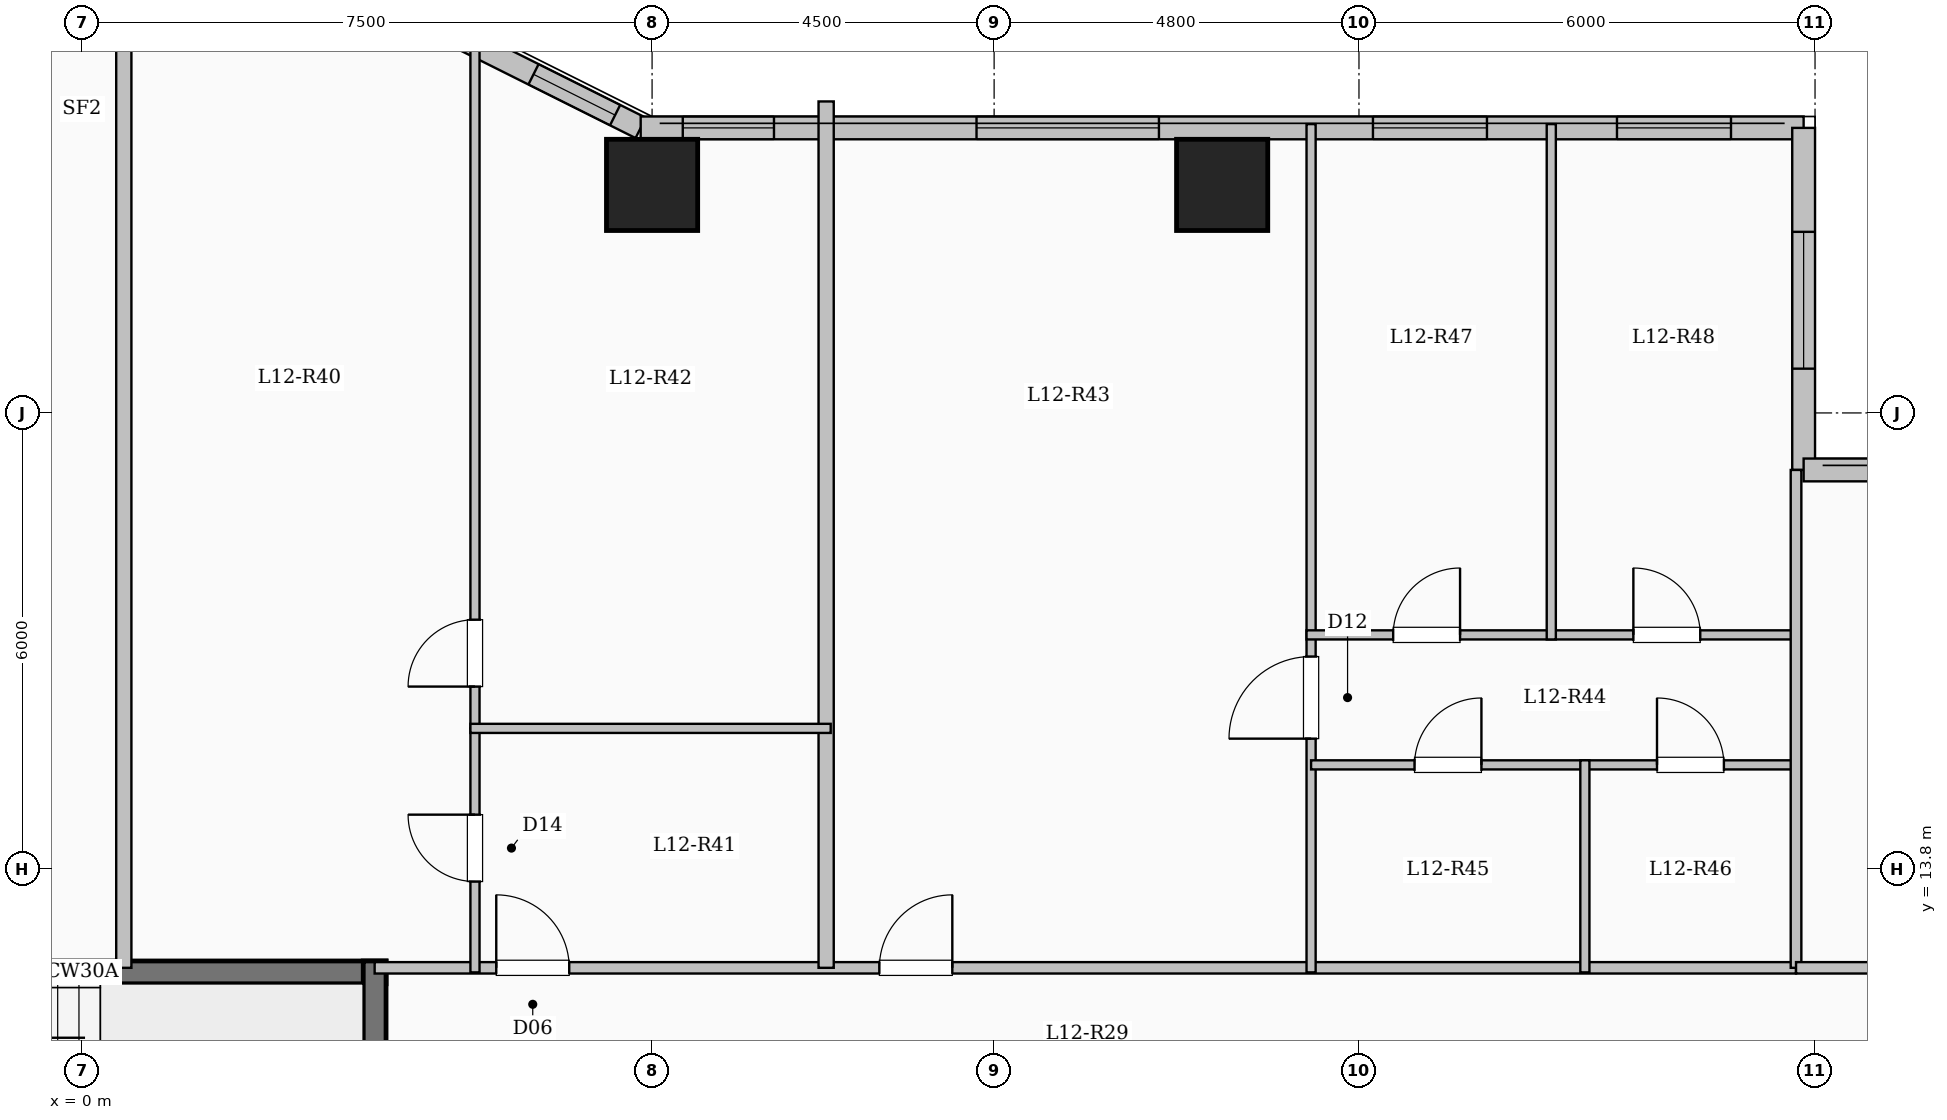
"""IFC4 building model, lengths in metres.
Left out: names, types, materials, properties, quantities, classifications, styles, units other than length and angle.
Written with IfcOpenShell. Run it as: python <this file> out.ifc"""

import sys

from ifc_helpers import new_model, si_unit, direction, frame, frame_2d, origin, origin_2d, place, context, subcontext, project, spatial, rectangle, extrude, element, fill, save


model = new_model("IFC4")
c1 = context("Model", 3, precision=1e-05, world=origin(), true_north=direction((0.0, 1.0)))
c2 = subcontext(c1, "Body", "Model", "MODEL_VIEW")
j1 = project(units=[si_unit("LENGTHUNIT", "METRE"), si_unit("PLANEANGLEUNIT", "RADIAN")], contexts=[c1])
p1 = place(None, origin())
s1 = spatial("IfcSite", under=j1, at=p1, CompositionType="ELEMENT")
p2 = place(p1, origin())
s2 = spatial("IfcBuilding", under=s1, at=p2, CompositionType="ELEMENT")
p3 = place(p2, frame((0.0, 0.0, 47.45)))
s3 = spatial("IfcBuildingStorey", under=s2, at=p3, CompositionType="ELEMENT", Elevation=47.45)
for number, where, z_axis, x_axis in (
    (1, (7.5, 22.8, 0.0), (0.0, 0.0, 1.0), (1.0, 0.0, 0.0)),
    (2, (15.0, 22.8, 0.0), (0.0, 0.0, 1.0), (1.0, 0.0, 0.0)),
):
    element("IfcColumn", number, at=place(p3, frame(where, z_axis=z_axis, x_axis=x_axis)), inside=s3, PredefinedType="COLUMN", context=c2, shape_type="SweptSolid", body=[
        extrude(rectangle(XDim=1.2, YDim=1.2, at=origin_2d()), origin(), (0.0, 0.0, 1.0), 3.35),
    ])
p4 = place(p3, frame((4.35, 25.05, 0.0), z_axis=(0.0, 0.0, 1.0), x_axis=(0.894427191, -0.4472135955, 0.0)))
e3 = element("IfcWall", 3, at=p4, inside=s3, PredefinedType="SOLIDWALL", context=c2, shape_type="SweptSolid", body=[
    extrude(rectangle(XDim=3.354, YDim=0.3, at=frame_2d((1.677, 0.0))), origin(), (0.0, 0.0, 1.0), 3.1),
])
p5 = place(p4, frame((1.778, 0.0, 0.95)))
e4 = element("IfcOpeningElement", 4, at=p5, cuts=e3, PredefinedType="OPENING", context=c2, shape_type="SweptSolid", body=[
    extrude(rectangle(XDim=1.2, YDim=1.5, at=frame_2d((0.6, 0.75))), frame((0.0, 0.16, 0.0), z_axis=(0.0, -1.0, 0.0), x_axis=(1.0, 0.0, 0.0)), (0.0, 0.0, 1.0), 0.32),
])
p6 = place(p3, frame((7.35, 23.55, 0.0), z_axis=(0.0, 0.0, 1.0), x_axis=(1.0, 0.0, 0.0)))
e5 = element("IfcWall", 5, at=p6, inside=s3, PredefinedType="SOLIDWALL", context=c2, shape_type="SweptSolid", body=[
    extrude(rectangle(XDim=15.3, YDim=0.3, at=frame_2d((7.65, 0.0))), origin(), (0.0, 0.0, 1.0), 3.1),
])
p7 = place(p6, frame((0.554, 0.0, 0.95)))
e6 = element("IfcOpeningElement", 6, at=p7, cuts=e5, PredefinedType="OPENING", context=c2, shape_type="SweptSolid", body=[
    extrude(rectangle(XDim=1.2, YDim=1.5, at=frame_2d((0.6, 0.75))), frame((0.0, 0.16, 0.0), z_axis=(0.0, -1.0, 0.0), x_axis=(1.0, 0.0, 0.0)), (0.0, 0.0, 1.0), 0.32),
])
p8 = place(p6, frame((4.418, 0.0, 0.9)))
e7 = element("IfcOpeningElement", 7, at=p8, cuts=e5, PredefinedType="OPENING", context=c2, shape_type="SweptSolid", body=[
    extrude(rectangle(XDim=2.4, YDim=1.8, at=frame_2d((1.2, 0.9))), frame((0.0, 0.16, 0.0), z_axis=(0.0, -1.0, 0.0), x_axis=(1.0, 0.0, 0.0)), (0.0, 0.0, 1.0), 0.32),
])
p9 = place(p6, frame((9.634, 0.0, 0.9)))
e8 = element("IfcOpeningElement", 8, at=p9, cuts=e5, PredefinedType="OPENING", context=c2, shape_type="SweptSolid", body=[
    extrude(rectangle(XDim=1.5, YDim=1.65, at=frame_2d((0.75, 0.825))), frame((0.0, 0.16, 0.0), z_axis=(0.0, -1.0, 0.0), x_axis=(1.0, 0.0, 0.0)), (0.0, 0.0, 1.0), 0.32),
])
p10 = place(p6, frame((12.844, 0.0, 0.9)))
e9 = element("IfcOpeningElement", 9, at=p10, cuts=e5, PredefinedType="OPENING", context=c2, shape_type="SweptSolid", body=[
    extrude(rectangle(XDim=1.5, YDim=1.65, at=frame_2d((0.75, 0.825))), frame((0.0, 0.16, 0.0), z_axis=(0.0, -1.0, 0.0), x_axis=(1.0, 0.0, 0.0)), (0.0, 0.0, 1.0), 0.32),
])
p11 = place(p3, frame((22.65, 23.55, 0.0), z_axis=(0.0, 0.0, 1.0), x_axis=(0.0, -1.0, 0.0)))
e10 = element("IfcWall", 10, at=p11, inside=s3, PredefinedType="SOLIDWALL", context=c2, shape_type="SweptSolid", body=[
    extrude(rectangle(XDim=4.5, YDim=0.3, at=frame_2d((2.25, 0.0))), origin(), (0.0, 0.0, 1.0), 3.1),
])
p12 = place(p11, frame((1.367, 0.0, 0.9)))
e11 = element("IfcOpeningElement", 11, at=p12, cuts=e10, PredefinedType="OPENING", context=c2, shape_type="SweptSolid", body=[
    extrude(rectangle(XDim=1.8, YDim=1.65, at=frame_2d((0.9, 0.825))), frame((0.0, 0.16, 0.0), z_axis=(0.0, -1.0, 0.0), x_axis=(1.0, 0.0, 0.0)), (0.0, 0.0, 1.0), 0.32),
])
p13 = place(p3, frame((22.65, 19.05, 0.0), z_axis=(0.0, 0.0, 1.0), x_axis=(1.0, 0.0, 0.0)))
e12 = element("IfcWall", 12, at=p13, inside=s3, PredefinedType="SOLIDWALL", context=c2, shape_type="SweptSolid", body=[
    extrude(rectangle(XDim=6.0, YDim=0.3, at=frame_2d((3.0, 0.0))), origin(), (0.0, 0.0, 1.0), 3.1),
])
p14 = place(p13, frame((1.975, 0.0, 0.9)))
e13 = element("IfcOpeningElement", 13, at=p14, cuts=e12, PredefinedType="OPENING", context=c2, shape_type="SweptSolid", body=[
    extrude(rectangle(XDim=2.0, YDim=1.7, at=frame_2d((1.0, 0.85))), frame((0.0, 0.16, 0.0), z_axis=(0.0, -1.0, 0.0), x_axis=(1.0, 0.0, 0.0)), (0.0, 0.0, 1.0), 0.32),
])
p15 = place(p3, frame((-4.0, 12.44, 0.0), z_axis=(0.0, 0.0, 1.0), x_axis=(1.0, 0.0, 0.0)))
e14 = element("IfcWall", 14, at=p15, inside=s3, PredefinedType="SHEAR", context=c2, shape_type="SweptSolid", body=[
    extrude(rectangle(XDim=8.0, YDim=0.3, at=frame_2d((4.0, 0.0))), origin(), (0.0, 0.0, 1.0), 3.35),
])
p16 = place(p3, frame((3.85, 9.0, 0.0), z_axis=(0.0, 0.0, 1.0), x_axis=(0.0, 1.0, 0.0)))
e15 = element("IfcWall", 15, at=p16, inside=s3, PredefinedType="SHEAR", context=c2, shape_type="SweptSolid", body=[
    extrude(rectangle(XDim=3.59, YDim=0.3, at=frame_2d((1.795, 0.0))), origin(), (0.0, 0.0, 1.0), 3.35),
])
p17 = place(p3, frame((3.85, 12.5, 0.0), z_axis=(0.0, 0.0, 1.0), x_axis=(1.0, 0.0, 0.0)))
e16 = element("IfcWall", 16, at=p17, inside=s3, PredefinedType="PARTITIONING", context=c2, shape_type="SweptSolid", body=[
    extrude(rectangle(XDim=18.7, YDim=0.15, at=frame_2d((9.35, 0.0))), origin(), (0.0, 0.0, 1.0), 3.1),
])
p18 = place(p17, frame((1.6, 0.0, 0.0)))
e17 = element("IfcOpeningElement", 17, at=p18, cuts=e16, PredefinedType="OPENING", context=c2, shape_type="SweptSolid", body=[
    extrude(rectangle(XDim=0.96, YDim=2.15, at=frame_2d((0.48, 1.075))), frame((0.0, 0.085, 0.0), z_axis=(0.0, -1.0, 0.0), x_axis=(1.0, 0.0, 0.0)), (0.0, 0.0, 1.0), 0.17),
])
p19 = place(p17, frame((6.64, 0.0, 0.0)))
e18 = element("IfcOpeningElement", 18, at=p19, cuts=e16, PredefinedType="OPENING", context=c2, shape_type="SweptSolid", body=[
    extrude(rectangle(XDim=0.96, YDim=2.15, at=frame_2d((0.48, 1.075))), frame((0.0, 0.085, 0.0), z_axis=(0.0, -1.0, 0.0), x_axis=(1.0, 0.0, 0.0)), (0.0, 0.0, 1.0), 0.17),
])
p20 = place(p3, frame((0.55, 12.5, 0.0), z_axis=(0.0, 0.0, 1.0), x_axis=(0.0, 1.0, 0.0)))
e19 = element("IfcWall", 19, at=p20, inside=s3, PredefinedType="SOLIDWALL", context=c2, shape_type="SweptSolid", body=[
    extrude(rectangle(XDim=12.58, YDim=0.2, at=frame_2d((6.29, 0.0))), origin(), (0.0, 0.0, 1.0), 3.1),
])
p21 = place(p3, frame((9.79, 12.5, 0.0), z_axis=(0.0, 0.0, 1.0), x_axis=(0.0, 1.0, 0.0)))
e20 = element("IfcWall", 20, at=p21, inside=s3, PredefinedType="SOLIDWALL", context=c2, shape_type="SweptSolid", body=[
    extrude(rectangle(XDim=11.398, YDim=0.2, at=frame_2d((5.699, 0.0))), origin(), (0.0, 0.0, 1.0), 3.1),
])
p22 = place(p3, frame((5.17, 12.44, 0.0), z_axis=(0.0, 0.0, 1.0), x_axis=(0.0, 1.0, 0.0)))
e21 = element("IfcWall", 21, at=p22, inside=s3, PredefinedType="PARTITIONING", context=c2, shape_type="SweptSolid", body=[
    extrude(rectangle(XDim=3.21, YDim=0.12, at=frame_2d((1.605, 0.0))), origin(), (0.0, 0.0, 1.0), 3.1),
])
p23 = place(p22, frame((1.195, 0.0, 0.0)))
e22 = element("IfcOpeningElement", 22, at=p23, cuts=e21, PredefinedType="OPENING", context=c2, shape_type="SweptSolid", body=[
    extrude(rectangle(XDim=0.88, YDim=2.1, at=frame_2d((0.44, 1.05))), frame((0.0, 0.07, 0.0), z_axis=(0.0, -1.0, 0.0), x_axis=(1.0, 0.0, 0.0)), (0.0, 0.0, 1.0), 0.14),
])
p24 = place(p3, frame((5.17, 15.65, 0.0), z_axis=(0.0, 0.0, 1.0), x_axis=(0.0, 1.0, 0.0)))
e23 = element("IfcWall", 23, at=p24, inside=s3, PredefinedType="PARTITIONING", context=c2, shape_type="SweptSolid", body=[
    extrude(rectangle(XDim=9.388, YDim=0.12, at=frame_2d((4.694, 0.0))), origin(), (0.0, 0.0, 1.0), 3.1),
])
p25 = place(p24, frame((0.55, 0.0, 0.0)))
e24 = element("IfcOpeningElement", 24, at=p25, cuts=e23, PredefinedType="OPENING", context=c2, shape_type="SweptSolid", body=[
    extrude(rectangle(XDim=0.88, YDim=2.1, at=frame_2d((0.44, 1.05))), frame((0.0, 0.07, 0.0), z_axis=(0.0, -1.0, 0.0), x_axis=(1.0, 0.0, 0.0)), (0.0, 0.0, 1.0), 0.14),
])
p26 = place(p3, frame((5.11, 15.65, 0.0), z_axis=(0.0, 0.0, 1.0), x_axis=(1.0, 0.0, 0.0)))
e25 = element("IfcWall", 25, at=p26, inside=s3, PredefinedType="PARTITIONING", context=c2, shape_type="SweptSolid", body=[
    extrude(rectangle(XDim=4.74, YDim=0.12, at=frame_2d((2.37, 0.0))), origin(), (0.0, 0.0, 1.0), 3.1),
])
p27 = place(p3, frame((16.17, 12.44, 0.0), z_axis=(0.0, 0.0, 1.0), x_axis=(0.0, 1.0, 0.0)))
e26 = element("IfcWall", 26, at=p27, inside=s3, PredefinedType="PARTITIONING", context=c2, shape_type="SweptSolid", body=[
    extrude(rectangle(XDim=11.16, YDim=0.12, at=frame_2d((5.58, 0.0))), origin(), (0.0, 0.0, 1.0), 3.1),
])
p28 = place(p27, frame((3.075, 0.0, 0.0)))
e27 = element("IfcOpeningElement", 27, at=p28, cuts=e26, PredefinedType="OPENING", context=c2, shape_type="SweptSolid", body=[
    extrude(rectangle(XDim=1.08, YDim=2.15, at=frame_2d((0.54, 1.075))), frame((0.0, 0.07, 0.0), z_axis=(0.0, -1.0, 0.0), x_axis=(1.0, 0.0, 0.0)), (0.0, 0.0, 1.0), 0.14),
])
p29 = place(p3, frame((16.17, 15.17, 0.0), z_axis=(0.0, 0.0, 1.0), x_axis=(1.0, 0.0, 0.0)))
e28 = element("IfcWall", 28, at=p29, inside=s3, PredefinedType="PARTITIONING", context=c2, shape_type="SweptSolid", body=[
    extrude(rectangle(XDim=3.602, YDim=0.12, at=frame_2d((1.801, 0.0))), origin(), (0.0, 0.0, 1.0), 3.1),
])
p30 = place(p29, frame((1.361, 0.0, 0.0)))
e29 = element("IfcOpeningElement", 29, at=p30, cuts=e28, PredefinedType="OPENING", context=c2, shape_type="SweptSolid", body=[
    extrude(rectangle(XDim=0.88, YDim=2.1, at=frame_2d((0.44, 1.05))), frame((0.0, 0.07, 0.0), z_axis=(0.0, -1.0, 0.0), x_axis=(1.0, 0.0, 0.0)), (0.0, 0.0, 1.0), 0.14),
])
p31 = place(p3, frame((19.772, 15.17, 0.0), z_axis=(0.0, 0.0, 1.0), x_axis=(1.0, 0.0, 0.0)))
e30 = element("IfcWall", 30, at=p31, inside=s3, PredefinedType="PARTITIONING", context=c2, shape_type="SweptSolid", body=[
    extrude(rectangle(XDim=2.778, YDim=0.12, at=frame_2d((1.389, 0.0))), origin(), (0.0, 0.0, 1.0), 3.1),
])
p32 = place(p31, frame((0.949, 0.0, 0.0)))
e31 = element("IfcOpeningElement", 31, at=p32, cuts=e30, PredefinedType="OPENING", context=c2, shape_type="SweptSolid", body=[
    extrude(rectangle(XDim=0.88, YDim=2.1, at=frame_2d((0.44, 1.05))), frame((0.0, 0.07, 0.0), z_axis=(0.0, -1.0, 0.0), x_axis=(1.0, 0.0, 0.0)), (0.0, 0.0, 1.0), 0.14),
])
p33 = place(p3, frame((16.11, 16.88, 0.0), z_axis=(0.0, 0.0, 1.0), x_axis=(1.0, 0.0, 0.0)))
e32 = element("IfcWall", 32, at=p33, inside=s3, PredefinedType="PARTITIONING", context=c2, shape_type="SweptSolid", body=[
    extrude(rectangle(XDim=6.5, YDim=0.12, at=frame_2d((3.25, 0.0))), origin(), (0.0, 0.0, 1.0), 3.1),
])
p34 = place(p33, frame((1.14, 0.0, 0.0)))
e33 = element("IfcOpeningElement", 33, at=p34, cuts=e32, PredefinedType="OPENING", context=c2, shape_type="SweptSolid", body=[
    extrude(rectangle(XDim=0.88, YDim=2.1, at=frame_2d((0.44, 1.05))), frame((0.0, 0.07, 0.0), z_axis=(0.0, -1.0, 0.0), x_axis=(1.0, 0.0, 0.0)), (0.0, 0.0, 1.0), 0.14),
])
p35 = place(p33, frame((4.3, 0.0, 0.0)))
e34 = element("IfcOpeningElement", 34, at=p35, cuts=e32, PredefinedType="OPENING", context=c2, shape_type="SweptSolid", body=[
    extrude(rectangle(XDim=0.88, YDim=2.1, at=frame_2d((0.44, 1.05))), frame((0.0, 0.07, 0.0), z_axis=(0.0, -1.0, 0.0), x_axis=(1.0, 0.0, 0.0)), (0.0, 0.0, 1.0), 0.14),
])
p36 = place(p3, frame((19.772, 12.44, 0.0), z_axis=(0.0, 0.0, 1.0), x_axis=(0.0, 1.0, 0.0)))
e35 = element("IfcWall", 35, at=p36, inside=s3, PredefinedType="PARTITIONING", context=c2, shape_type="SweptSolid", body=[
    extrude(rectangle(XDim=2.79, YDim=0.12, at=frame_2d((1.395, 0.0))), origin(), (0.0, 0.0, 1.0), 3.1),
])
p37 = place(p3, frame((19.33, 16.82, 0.0), z_axis=(0.0, 0.0, 1.0), x_axis=(0.0, 1.0, 0.0)))
e36 = element("IfcWall", 36, at=p37, inside=s3, PredefinedType="PARTITIONING", context=c2, shape_type="SweptSolid", body=[
    extrude(rectangle(XDim=6.78, YDim=0.12, at=frame_2d((3.39, 0.0))), origin(), (0.0, 0.0, 1.0), 3.1),
])
p38 = place(p3, frame((22.55, 12.5, 0.0), z_axis=(0.0, 0.0, 1.0), x_axis=(0.0, 1.0, 0.0)))
e37 = element("IfcWall", 37, at=p38, inside=s3, PredefinedType="PARTITIONING", context=c2, shape_type="SweptSolid", body=[
    extrude(rectangle(XDim=6.55, YDim=0.14, at=frame_2d((3.275, 0.0))), origin(), (0.0, 0.0, 1.0), 3.1),
])
p39 = place(p3, frame((22.55, 12.5, 0.0), z_axis=(0.0, 0.0, 1.0), x_axis=(1.0, 0.0, 0.0)))
e38 = element("IfcWall", 38, at=p39, inside=s3, PredefinedType="PARTITIONING", context=c2, shape_type="SweptSolid", body=[
    extrude(rectangle(XDim=6.13, YDim=0.15, at=frame_2d((3.065, 0.0))), origin(), (0.0, 0.0, 1.0), 3.1),
])
p40 = place(p39, frame((2.59, 0.0, 0.0)))
e39 = element("IfcOpeningElement", 39, at=p40, cuts=e38, PredefinedType="OPENING", context=c2, shape_type="SweptSolid", body=[
    extrude(rectangle(XDim=0.95, YDim=2.15, at=frame_2d((0.475, 1.075))), frame((0.0, 0.085, 0.0), z_axis=(0.0, -1.0, 0.0), x_axis=(1.0, 0.0, 0.0)), (0.0, 0.0, 1.0), 0.17),
])
p41 = place(p5, origin())
e40 = element("IfcWindow", 40, at=p41, inside=s3, PartitioningType="SINGLE_PANEL", PredefinedType="WINDOW", context=c2, shape_type="SweptSolid", body=[
    extrude(rectangle(XDim=1.2, YDim=1.5, at=frame_2d((0.6, 0.75))), frame((0.0, 0.03, 0.0), z_axis=(0.0, -1.0, 0.0), x_axis=(1.0, 0.0, 0.0)), (0.0, 0.0, 1.0), 0.06),
])
fill(e4, e40)
p42 = place(p7, origin())
e41 = element("IfcWindow", 41, at=p42, inside=s3, PartitioningType="SINGLE_PANEL", PredefinedType="WINDOW", context=c2, shape_type="SweptSolid", body=[
    extrude(rectangle(XDim=1.2, YDim=1.5, at=frame_2d((0.6, 0.75))), frame((0.0, 0.03, 0.0), z_axis=(0.0, -1.0, 0.0), x_axis=(1.0, 0.0, 0.0)), (0.0, 0.0, 1.0), 0.06),
])
fill(e6, e41)
p43 = place(p8, origin())
e42 = element("IfcWindow", 42, at=p43, inside=s3, PartitioningType="SINGLE_PANEL", PredefinedType="WINDOW", context=c2, shape_type="SweptSolid", body=[
    extrude(rectangle(XDim=2.4, YDim=1.8, at=frame_2d((1.2, 0.9))), frame((0.0, 0.03, 0.0), z_axis=(0.0, -1.0, 0.0), x_axis=(1.0, 0.0, 0.0)), (0.0, 0.0, 1.0), 0.06),
])
fill(e7, e42)
p44 = place(p9, origin())
e43 = element("IfcWindow", 43, at=p44, inside=s3, PartitioningType="SINGLE_PANEL", PredefinedType="WINDOW", context=c2, shape_type="SweptSolid", body=[
    extrude(rectangle(XDim=1.5, YDim=1.65, at=frame_2d((0.75, 0.825))), frame((0.0, 0.03, 0.0), z_axis=(0.0, -1.0, 0.0), x_axis=(1.0, 0.0, 0.0)), (0.0, 0.0, 1.0), 0.06),
])
fill(e8, e43)
p45 = place(p10, origin())
e44 = element("IfcWindow", 44, at=p45, inside=s3, PartitioningType="SINGLE_PANEL", PredefinedType="WINDOW", context=c2, shape_type="SweptSolid", body=[
    extrude(rectangle(XDim=1.5, YDim=1.65, at=frame_2d((0.75, 0.825))), frame((0.0, 0.03, 0.0), z_axis=(0.0, -1.0, 0.0), x_axis=(1.0, 0.0, 0.0)), (0.0, 0.0, 1.0), 0.06),
])
fill(e9, e44)
p46 = place(p12, origin())
e45 = element("IfcWindow", 45, at=p46, inside=s3, PartitioningType="SINGLE_PANEL", PredefinedType="WINDOW", context=c2, shape_type="SweptSolid", body=[
    extrude(rectangle(XDim=1.8, YDim=1.65, at=frame_2d((0.9, 0.825))), frame((0.0, 0.03, 0.0), z_axis=(0.0, -1.0, 0.0), x_axis=(1.0, 0.0, 0.0)), (0.0, 0.0, 1.0), 0.06),
])
fill(e11, e45)
p47 = place(p18, origin())
e46 = element("IfcDoor", 46, at=p47, inside=s3, OperationType="SINGLE_SWING_LEFT", PredefinedType="DOOR", context=c2, shape_type="SweptSolid", body=[
    extrude(rectangle(XDim=0.96, YDim=2.15, at=frame_2d((0.48, 1.075))), frame((0.0, 0.025, 0.0), z_axis=(0.0, -1.0, 0.0), x_axis=(1.0, 0.0, 0.0)), (0.0, 0.0, 1.0), 0.05),
])
fill(e17, e46)
p48 = place(p23, origin())
e47 = element("IfcDoor", 47, at=p48, inside=s3, OperationType="SINGLE_SWING_RIGHT", PredefinedType="DOOR", context=c2, shape_type="SweptSolid", body=[
    extrude(rectangle(XDim=0.88, YDim=2.1, at=frame_2d((0.44, 1.05))), frame((0.0, 0.025, 0.0), z_axis=(0.0, -1.0, 0.0), x_axis=(1.0, 0.0, 0.0)), (0.0, 0.0, 1.0), 0.05),
])
fill(e22, e47)
p49 = place(p25, origin())
e48 = element("IfcDoor", 48, at=p49, inside=s3, OperationType="SINGLE_SWING_LEFT", PredefinedType="DOOR", context=c2, shape_type="SweptSolid", body=[
    extrude(rectangle(XDim=0.88, YDim=2.1, at=frame_2d((0.44, 1.05))), frame((0.0, 0.025, 0.0), z_axis=(0.0, -1.0, 0.0), x_axis=(1.0, 0.0, 0.0)), (0.0, 0.0, 1.0), 0.05),
])
fill(e24, e48)
p50 = place(p19, origin())
e49 = element("IfcDoor", 49, at=p50, inside=s3, OperationType="SINGLE_SWING_RIGHT", PredefinedType="DOOR", context=c2, shape_type="SweptSolid", body=[
    extrude(rectangle(XDim=0.96, YDim=2.15, at=frame_2d((0.48, 1.075))), frame((0.0, 0.025, 0.0), z_axis=(0.0, -1.0, 0.0), x_axis=(1.0, 0.0, 0.0)), (0.0, 0.0, 1.0), 0.05),
])
fill(e18, e49)
p51 = place(p28, origin())
e50 = element("IfcDoor", 50, at=p51, inside=s3, OperationType="SINGLE_SWING_LEFT", PredefinedType="DOOR", context=c2, shape_type="SweptSolid", body=[
    extrude(rectangle(XDim=1.08, YDim=2.15, at=frame_2d((0.54, 1.075))), frame((0.0, 0.025, 0.0), z_axis=(0.0, -1.0, 0.0), x_axis=(1.0, 0.0, 0.0)), (0.0, 0.0, 1.0), 0.05),
])
fill(e27, e50)
p52 = place(p30, origin())
e51 = element("IfcDoor", 51, at=p52, inside=s3, OperationType="SINGLE_SWING_RIGHT", PredefinedType="DOOR", context=c2, shape_type="SweptSolid", body=[
    extrude(rectangle(XDim=0.88, YDim=2.1, at=frame_2d((0.44, 1.05))), frame((0.0, 0.025, 0.0), z_axis=(0.0, -1.0, 0.0), x_axis=(1.0, 0.0, 0.0)), (0.0, 0.0, 1.0), 0.05),
])
fill(e29, e51)
p53 = place(p32, origin())
e52 = element("IfcDoor", 52, at=p53, inside=s3, OperationType="SINGLE_SWING_LEFT", PredefinedType="DOOR", context=c2, shape_type="SweptSolid", body=[
    extrude(rectangle(XDim=0.88, YDim=2.1, at=frame_2d((0.44, 1.05))), frame((0.0, 0.025, 0.0), z_axis=(0.0, -1.0, 0.0), x_axis=(1.0, 0.0, 0.0)), (0.0, 0.0, 1.0), 0.05),
])
fill(e31, e52)
p54 = place(p34, origin())
e53 = element("IfcDoor", 53, at=p54, inside=s3, OperationType="SINGLE_SWING_RIGHT", PredefinedType="DOOR", context=c2, shape_type="SweptSolid", body=[
    extrude(rectangle(XDim=0.88, YDim=2.1, at=frame_2d((0.44, 1.05))), frame((0.0, 0.025, 0.0), z_axis=(0.0, -1.0, 0.0), x_axis=(1.0, 0.0, 0.0)), (0.0, 0.0, 1.0), 0.05),
])
fill(e33, e53)
p55 = place(p35, origin())
e54 = element("IfcDoor", 54, at=p55, inside=s3, OperationType="SINGLE_SWING_LEFT", PredefinedType="DOOR", context=c2, shape_type="SweptSolid", body=[
    extrude(rectangle(XDim=0.88, YDim=2.1, at=frame_2d((0.44, 1.05))), frame((0.0, 0.025, 0.0), z_axis=(0.0, -1.0, 0.0), x_axis=(1.0, 0.0, 0.0)), (0.0, 0.0, 1.0), 0.05),
])
fill(e34, e54)
save(model, sys.argv[1])
